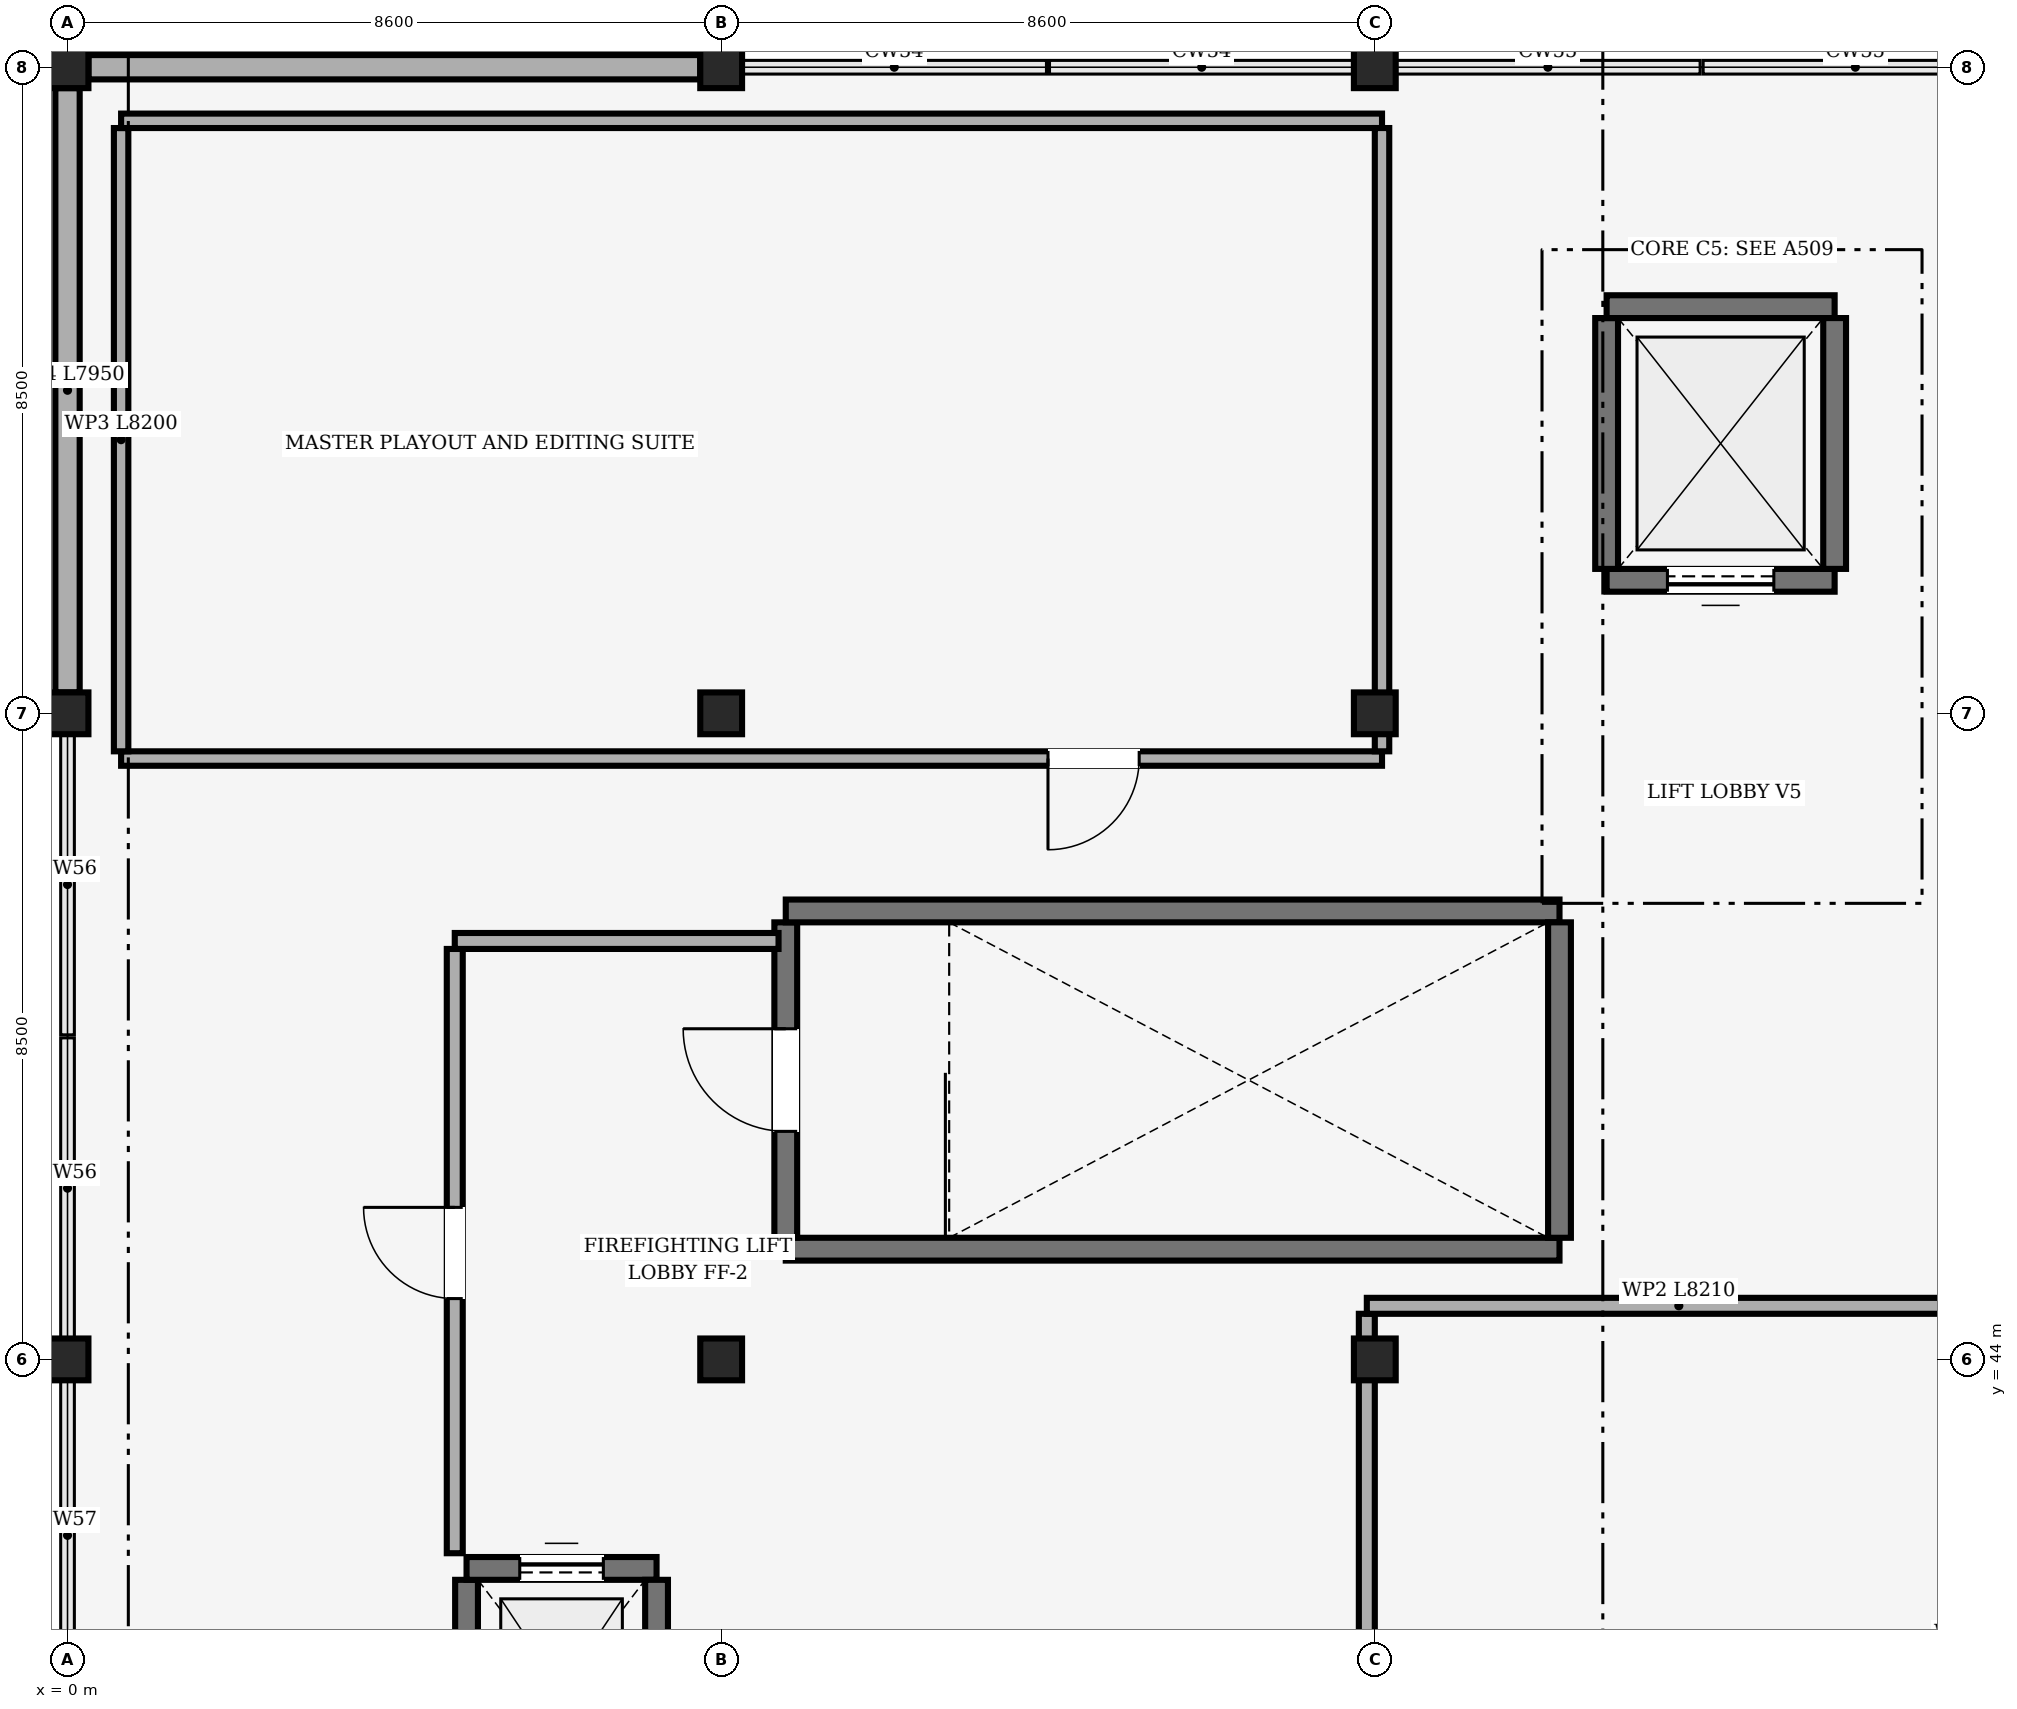
"""IFC4 building model, lengths in metres.
Left out: names, types, materials, properties, quantities, classifications, styles, units other than length and angle.
Written with IfcOpenShell. Run it as: python <this file> out.ifc"""

import sys

from ifc_helpers import new_model, si_unit, direction, frame, frame_2d, origin, origin_2d, place, context, subcontext, project, spatial, rectangle, extrude, element, fill, save


model = new_model("IFC4")
c1 = context("Model", 3, precision=1e-05, world=origin(), true_north=direction((0.0, 1.0)))
c2 = subcontext(c1, "Body", "Model", "MODEL_VIEW")
j1 = project(units=[si_unit("LENGTHUNIT", "METRE"), si_unit("PLANEANGLEUNIT", "RADIAN")], contexts=[c1])
p1 = place(None, origin())
s1 = spatial("IfcSite", under=j1, at=p1, CompositionType="ELEMENT")
p2 = place(p1, origin())
s2 = spatial("IfcBuilding", under=s1, at=p2, CompositionType="ELEMENT")
p3 = place(p2, frame((0.0, 0.0, 19.05)))
s3 = spatial("IfcBuildingStorey", under=s2, at=p3, CompositionType="ELEMENT", Elevation=19.05)
for number, where, z_axis, x_axis in (
    (1, (0.0, 44.0, 0.0), (0.0, 0.0, 1.0), (1.0, 0.0, 0.0)),
    (2, (0.0, 52.5, 0.0), (0.0, 0.0, 1.0), (1.0, 0.0, 0.0)),
    (3, (0.0, 61.0, 0.0), (0.0, 0.0, 1.0), (1.0, 0.0, 0.0)),
    (4, (8.6, 44.0, 0.0), (0.0, 0.0, 1.0), (1.0, 0.0, 0.0)),
    (5, (8.6, 52.5, 0.0), (0.0, 0.0, 1.0), (1.0, 0.0, 0.0)),
    (6, (8.6, 61.0, 0.0), (0.0, 0.0, 1.0), (1.0, 0.0, 0.0)),
    (7, (17.2, 44.0, 0.0), (0.0, 0.0, 1.0), (1.0, 0.0, 0.0)),
    (8, (17.2, 52.5, 0.0), (0.0, 0.0, 1.0), (1.0, 0.0, 0.0)),
    (9, (17.2, 61.0, 0.0), (0.0, 0.0, 1.0), (1.0, 0.0, 0.0)),
):
    element("IfcColumn", number, at=place(p3, frame(where, z_axis=z_axis, x_axis=x_axis)), inside=s3, PredefinedType="COLUMN", context=c2, shape_type="SweptSolid", body=[
        extrude(rectangle(XDim=0.55, YDim=0.55, at=origin_2d()), origin(), (0.0, 0.0, 1.0), 3.06),
    ])
p4 = place(p3, frame((0.275, 61.0, 0.0), z_axis=(0.0, 0.0, 1.0), x_axis=(1.0, 0.0, 0.0)))
e10 = element("IfcWall", 10, at=p4, inside=s3, PredefinedType="SOLIDWALL", context=c2, shape_type="SweptSolid", body=[
    extrude(rectangle(XDim=8.05, YDim=0.32, at=frame_2d((4.025, 0.0))), origin(), (0.0, 0.0, 1.0), 2.445),
])
p5 = place(p3, frame((0.0, 60.725, 0.0), z_axis=(0.0, 0.0, 1.0), x_axis=(0.0, -1.0, 0.0)))
e11 = element("IfcWall", 11, at=p5, inside=s3, PredefinedType="SOLIDWALL", context=c2, shape_type="SweptSolid", body=[
    extrude(rectangle(XDim=7.95, YDim=0.32, at=frame_2d((3.975, 0.0))), origin(), (0.0, 0.0, 1.0), 2.395),
])
p6 = place(p3, frame((19.63, 45.45, 0.0), z_axis=(0.0, 0.0, 1.0), x_axis=(-1.0, 0.0, 0.0)))
e12 = element("IfcWall", 12, at=p6, inside=s3, PredefinedType="SHEAR", context=c2, shape_type="SweptSolid", body=[
    extrude(rectangle(XDim=10.18, YDim=0.3, at=frame_2d((5.09, 0.0))), origin(), (0.0, 0.0, 1.0), 3.06),
])
p7 = place(p3, frame((9.45, 45.6, 0.0), z_axis=(0.0, 0.0, 1.0), x_axis=(0.0, 1.0, 0.0)))
e13 = element("IfcWall", 13, at=p7, inside=s3, PredefinedType="SHEAR", context=c2, shape_type="SweptSolid", body=[
    extrude(rectangle(XDim=4.15, YDim=0.3, at=frame_2d((2.075, 0.0))), origin(), (0.0, 0.0, 1.0), 3.06),
])
p8 = place(p7, frame((1.4, 0.0, 0.0)))
e14 = element("IfcOpeningElement", 14, at=p8, cuts=e13, PredefinedType="OPENING", context=c2, shape_type="SweptSolid", body=[
    extrude(rectangle(XDim=1.35, YDim=2.2, at=frame_2d((0.675, 1.1))), frame((0.0, 0.15, 0.0), z_axis=(0.0, -1.0, 0.0), x_axis=(1.0, 0.0, 0.0)), (0.0, 0.0, 1.0), 0.3),
])
p9 = place(p3, frame((9.45, 49.9, 0.0), z_axis=(0.0, 0.0, 1.0), x_axis=(1.0, 0.0, 0.0)))
e15 = element("IfcWall", 15, at=p9, inside=s3, PredefinedType="SHEAR", context=c2, shape_type="SweptSolid", body=[
    extrude(rectangle(XDim=10.18, YDim=0.3, at=frame_2d((5.09, 0.0))), origin(), (0.0, 0.0, 1.0), 3.06),
])
p10 = place(p3, frame((19.63, 49.75, 0.0), z_axis=(0.0, 0.0, 1.0), x_axis=(0.0, -1.0, 0.0)))
e16 = element("IfcWall", 16, at=p10, inside=s3, PredefinedType="SHEAR", context=c2, shape_type="SweptSolid", body=[
    extrude(rectangle(XDim=4.15, YDim=0.3, at=frame_2d((2.075, 0.0))), origin(), (0.0, 0.0, 1.0), 3.06),
])
p11 = place(p3, frame((5.25, 38.2, 0.0), z_axis=(0.0, 0.0, 1.0), x_axis=(0.0, 1.0, 0.0)))
e17 = element("IfcWall", 17, at=p11, inside=s3, PredefinedType="SHEAR", context=c2, shape_type="SweptSolid", body=[
    extrude(rectangle(XDim=2.9, YDim=0.3, at=frame_2d((1.45, 0.0))), origin(), (0.0, 0.0, 1.0), 3.06),
])
p12 = place(p3, frame((5.25, 41.25, 0.0), z_axis=(0.0, 0.0, 1.0), x_axis=(1.0, 0.0, 0.0)))
e18 = element("IfcWall", 18, at=p12, inside=s3, PredefinedType="SHEAR", context=c2, shape_type="SweptSolid", body=[
    extrude(rectangle(XDim=2.5, YDim=0.3, at=frame_2d((1.25, 0.0))), origin(), (0.0, 0.0, 1.0), 3.06),
])
p13 = place(p12, frame((0.7, 0.0, 0.0)))
e19 = element("IfcOpeningElement", 19, at=p13, cuts=e18, PredefinedType="OPENING", context=c2, shape_type="SweptSolid", body=[
    extrude(rectangle(XDim=1.1, YDim=2.1, at=frame_2d((0.55, 1.05))), frame((0.0, 0.15, 0.0), z_axis=(0.0, -1.0, 0.0), x_axis=(1.0, 0.0, 0.0)), (0.0, 0.0, 1.0), 0.3),
])
p14 = place(p3, frame((7.75, 41.1, 0.0), z_axis=(0.0, 0.0, 1.0), x_axis=(0.0, -1.0, 0.0)))
e20 = element("IfcWall", 20, at=p14, inside=s3, PredefinedType="SHEAR", context=c2, shape_type="SweptSolid", body=[
    extrude(rectangle(XDim=2.9, YDim=0.3, at=frame_2d((1.45, 0.0))), origin(), (0.0, 0.0, 1.0), 3.06),
])
p15 = place(p3, frame((23.25, 54.25, 0.0), z_axis=(0.0, 0.0, 1.0), x_axis=(-1.0, 0.0, 0.0)))
e21 = element("IfcWall", 21, at=p15, inside=s3, PredefinedType="SHEAR", context=c2, shape_type="SweptSolid", body=[
    extrude(rectangle(XDim=3.0, YDim=0.3, at=frame_2d((1.5, 0.0))), origin(), (0.0, 0.0, 1.0), 3.06),
])
p16 = place(p15, frame((0.8, 0.0, 0.0)))
e22 = element("IfcOpeningElement", 22, at=p16, cuts=e21, PredefinedType="OPENING", context=c2, shape_type="SweptSolid", body=[
    extrude(rectangle(XDim=1.4, YDim=2.2, at=frame_2d((0.7, 1.1))), frame((0.0, 0.15, 0.0), z_axis=(0.0, -1.0, 0.0), x_axis=(1.0, 0.0, 0.0)), (0.0, 0.0, 1.0), 0.3),
])
p17 = place(p3, frame((20.25, 54.4, 0.0), z_axis=(0.0, 0.0, 1.0), x_axis=(0.0, 1.0, 0.0)))
e23 = element("IfcWall", 23, at=p17, inside=s3, PredefinedType="SHEAR", context=c2, shape_type="SweptSolid", body=[
    extrude(rectangle(XDim=3.3, YDim=0.3, at=frame_2d((1.65, 0.0))), origin(), (0.0, 0.0, 1.0), 3.06),
])
p18 = place(p3, frame((20.25, 57.85, 0.0), z_axis=(0.0, 0.0, 1.0), x_axis=(1.0, 0.0, 0.0)))
e24 = element("IfcWall", 24, at=p18, inside=s3, PredefinedType="SHEAR", context=c2, shape_type="SweptSolid", body=[
    extrude(rectangle(XDim=3.0, YDim=0.3, at=frame_2d((1.5, 0.0))), origin(), (0.0, 0.0, 1.0), 3.06),
])
p19 = place(p3, frame((23.25, 57.7, 0.0), z_axis=(0.0, 0.0, 1.0), x_axis=(0.0, -1.0, 0.0)))
e25 = element("IfcWall", 25, at=p19, inside=s3, PredefinedType="SHEAR", context=c2, shape_type="SweptSolid", body=[
    extrude(rectangle(XDim=3.3, YDim=0.3, at=frame_2d((1.65, 0.0))), origin(), (0.0, 0.0, 1.0), 3.06),
])
p20 = place(p3, frame((5.095, 41.45, 0.0), z_axis=(0.0, 0.0, 1.0), x_axis=(0.0, 1.0, 0.0)))
e26 = element("IfcWall", 26, at=p20, inside=s3, PredefinedType="PARTITIONING", context=c2, shape_type="SweptSolid", body=[
    extrude(rectangle(XDim=7.95, YDim=0.21, at=frame_2d((3.975, 0.0))), origin(), (0.0, 0.0, 1.0), 3.04),
])
p21 = place(p20, frame((3.35, 0.0, 0.0)))
e27 = element("IfcOpeningElement", 27, at=p21, cuts=e26, PredefinedType="OPENING", context=c2, shape_type="SweptSolid", body=[
    extrude(rectangle(XDim=1.2, YDim=2.15, at=frame_2d((0.6, 1.075))), frame((0.0, 0.105, 0.0), z_axis=(0.0, -1.0, 0.0), x_axis=(1.0, 0.0, 0.0)), (0.0, 0.0, 1.0), 0.21),
])
p22 = place(p3, frame((5.095, 49.505, 0.0), z_axis=(0.0, 0.0, 1.0), x_axis=(1.0, 0.0, 0.0)))
e28 = element("IfcWall", 28, at=p22, inside=s3, PredefinedType="PARTITIONING", context=c2, shape_type="SweptSolid", body=[
    extrude(rectangle(XDim=4.26, YDim=0.21, at=frame_2d((2.13, 0.0))), origin(), (0.0, 0.0, 1.0), 3.04),
])
p23 = place(p3, frame((17.095, 35.8, 0.0), z_axis=(0.0, 0.0, 1.0), x_axis=(0.0, 1.0, 0.0)))
e29 = element("IfcWall", 29, at=p23, inside=s3, PredefinedType="PARTITIONING", context=c2, shape_type="SweptSolid", body=[
    extrude(rectangle(XDim=8.8, YDim=0.21, at=frame_2d((4.4, 0.0))), origin(), (0.0, 0.0, 1.0), 2.44),
])
p24 = place(p23, frame((3.0, 0.0, 0.0)))
e30 = element("IfcOpeningElement", 30, at=p24, cuts=e29, PredefinedType="OPENING", context=c2, shape_type="SweptSolid", body=[
    extrude(rectangle(XDim=1.4, YDim=2.15, at=frame_2d((0.7, 1.075))), frame((0.0, 0.105, 0.0), z_axis=(0.0, -1.0, 0.0), x_axis=(1.0, 0.0, 0.0)), (0.0, 0.0, 1.0), 0.21),
])
p25 = place(p3, frame((17.095, 44.705, 0.0), z_axis=(0.0, 0.0, 1.0), x_axis=(1.0, 0.0, 0.0)))
e31 = element("IfcWall", 31, at=p25, inside=s3, PredefinedType="PARTITIONING", context=c2, shape_type="SweptSolid", body=[
    extrude(rectangle(XDim=8.21, YDim=0.21, at=frame_2d((4.105, 0.0))), origin(), (0.0, 0.0, 1.0), 3.04),
])
p26 = place(p3, frame((17.295, 51.905, 0.0), z_axis=(0.0, 0.0, 1.0), x_axis=(-1.0, 0.0, 0.0)))
e32 = element("IfcWall", 32, at=p26, inside=s3, PredefinedType="PARTITIONING", context=c2, shape_type="SweptSolid", body=[
    extrude(rectangle(XDim=16.59, YDim=0.19, at=frame_2d((8.295, 0.0))), origin(), (0.0, 0.0, 1.0), 3.04),
])
p27 = place(p26, frame((3.195, 0.0, 0.0)))
e33 = element("IfcOpeningElement", 33, at=p27, cuts=e32, PredefinedType="OPENING", context=c2, shape_type="SweptSolid", body=[
    extrude(rectangle(XDim=1.2, YDim=2.15, at=frame_2d((0.6, 1.075))), frame((0.0, 0.095, 0.0), z_axis=(0.0, -1.0, 0.0), x_axis=(1.0, 0.0, 0.0)), (0.0, 0.0, 1.0), 0.19),
])
p28 = place(p3, frame((0.705, 52.0, 0.0), z_axis=(0.0, 0.0, 1.0), x_axis=(0.0, 1.0, 0.0)))
e34 = element("IfcWall", 34, at=p28, inside=s3, PredefinedType="PARTITIONING", context=c2, shape_type="SweptSolid", body=[
    extrude(rectangle(XDim=8.2, YDim=0.19, at=frame_2d((4.1, 0.0))), origin(), (0.0, 0.0, 1.0), 3.04),
])
p29 = place(p3, frame((0.705, 60.295, 0.0), z_axis=(0.0, 0.0, 1.0), x_axis=(1.0, 0.0, 0.0)))
e35 = element("IfcWall", 35, at=p29, inside=s3, PredefinedType="PARTITIONING", context=c2, shape_type="SweptSolid", body=[
    extrude(rectangle(XDim=16.59, YDim=0.19, at=frame_2d((8.295, 0.0))), origin(), (0.0, 0.0, 1.0), 3.04),
])
p30 = place(p3, frame((17.295, 60.2, 0.0), z_axis=(0.0, 0.0, 1.0), x_axis=(0.0, -1.0, 0.0)))
e36 = element("IfcWall", 36, at=p30, inside=s3, PredefinedType="PARTITIONING", context=c2, shape_type="SweptSolid", body=[
    extrude(rectangle(XDim=8.2, YDim=0.19, at=frame_2d((4.1, 0.0))), origin(), (0.0, 0.0, 1.0), 2.49),
])
p31 = place(p8, origin())
e37 = element("IfcDoor", 37, at=p31, inside=s3, OperationType="SINGLE_SWING_RIGHT", PredefinedType="DOOR", context=c2, shape_type="SweptSolid", body=[
    extrude(rectangle(XDim=1.35, YDim=2.2, at=frame_2d((0.675, 1.1))), frame((0.0, 0.025, 0.0), z_axis=(0.0, -1.0, 0.0), x_axis=(1.0, 0.0, 0.0)), (0.0, 0.0, 1.0), 0.05),
])
fill(e14, e37)
p32 = place(p13, origin())
e38 = element("IfcDoor", 38, at=p32, inside=s3, OperationType="SLIDING_TO_LEFT", PredefinedType="DOOR", context=c2, shape_type="SweptSolid", body=[
    extrude(rectangle(XDim=1.1, YDim=2.1, at=frame_2d((0.55, 1.05))), frame((0.0, 0.025, 0.0), z_axis=(0.0, -1.0, 0.0), x_axis=(1.0, 0.0, 0.0)), (0.0, 0.0, 1.0), 0.05),
])
fill(e19, e38)
p33 = place(p16, origin())
e39 = element("IfcDoor", 39, at=p33, inside=s3, OperationType="DOUBLE_DOOR_SLIDING", PredefinedType="DOOR", context=c2, shape_type="SweptSolid", body=[
    extrude(rectangle(XDim=1.4, YDim=2.2, at=frame_2d((0.7, 1.1))), frame((0.0, 0.025, 0.0), z_axis=(0.0, -1.0, 0.0), x_axis=(1.0, 0.0, 0.0)), (0.0, 0.0, 1.0), 0.05),
])
fill(e22, e39)
p34 = place(p21, origin())
e40 = element("IfcDoor", 40, at=p34, inside=s3, OperationType="SINGLE_SWING_RIGHT", PredefinedType="DOOR", context=c2, shape_type="SweptSolid", body=[
    extrude(rectangle(XDim=1.2, YDim=2.15, at=frame_2d((0.6, 1.075))), frame((0.0, 0.025, 0.0), z_axis=(0.0, -1.0, 0.0), x_axis=(1.0, 0.0, 0.0)), (0.0, 0.0, 1.0), 0.05),
])
fill(e27, e40)
p35 = place(p27, origin())
e41 = element("IfcDoor", 41, at=p35, inside=s3, OperationType="SINGLE_SWING_RIGHT", PredefinedType="DOOR", context=c2, shape_type="SweptSolid", body=[
    extrude(rectangle(XDim=1.2, YDim=2.15, at=frame_2d((0.6, 1.075))), frame((0.0, 0.025, 0.0), z_axis=(0.0, -1.0, 0.0), x_axis=(1.0, 0.0, 0.0)), (0.0, 0.0, 1.0), 0.05),
])
fill(e33, e41)
save(model, sys.argv[1])
